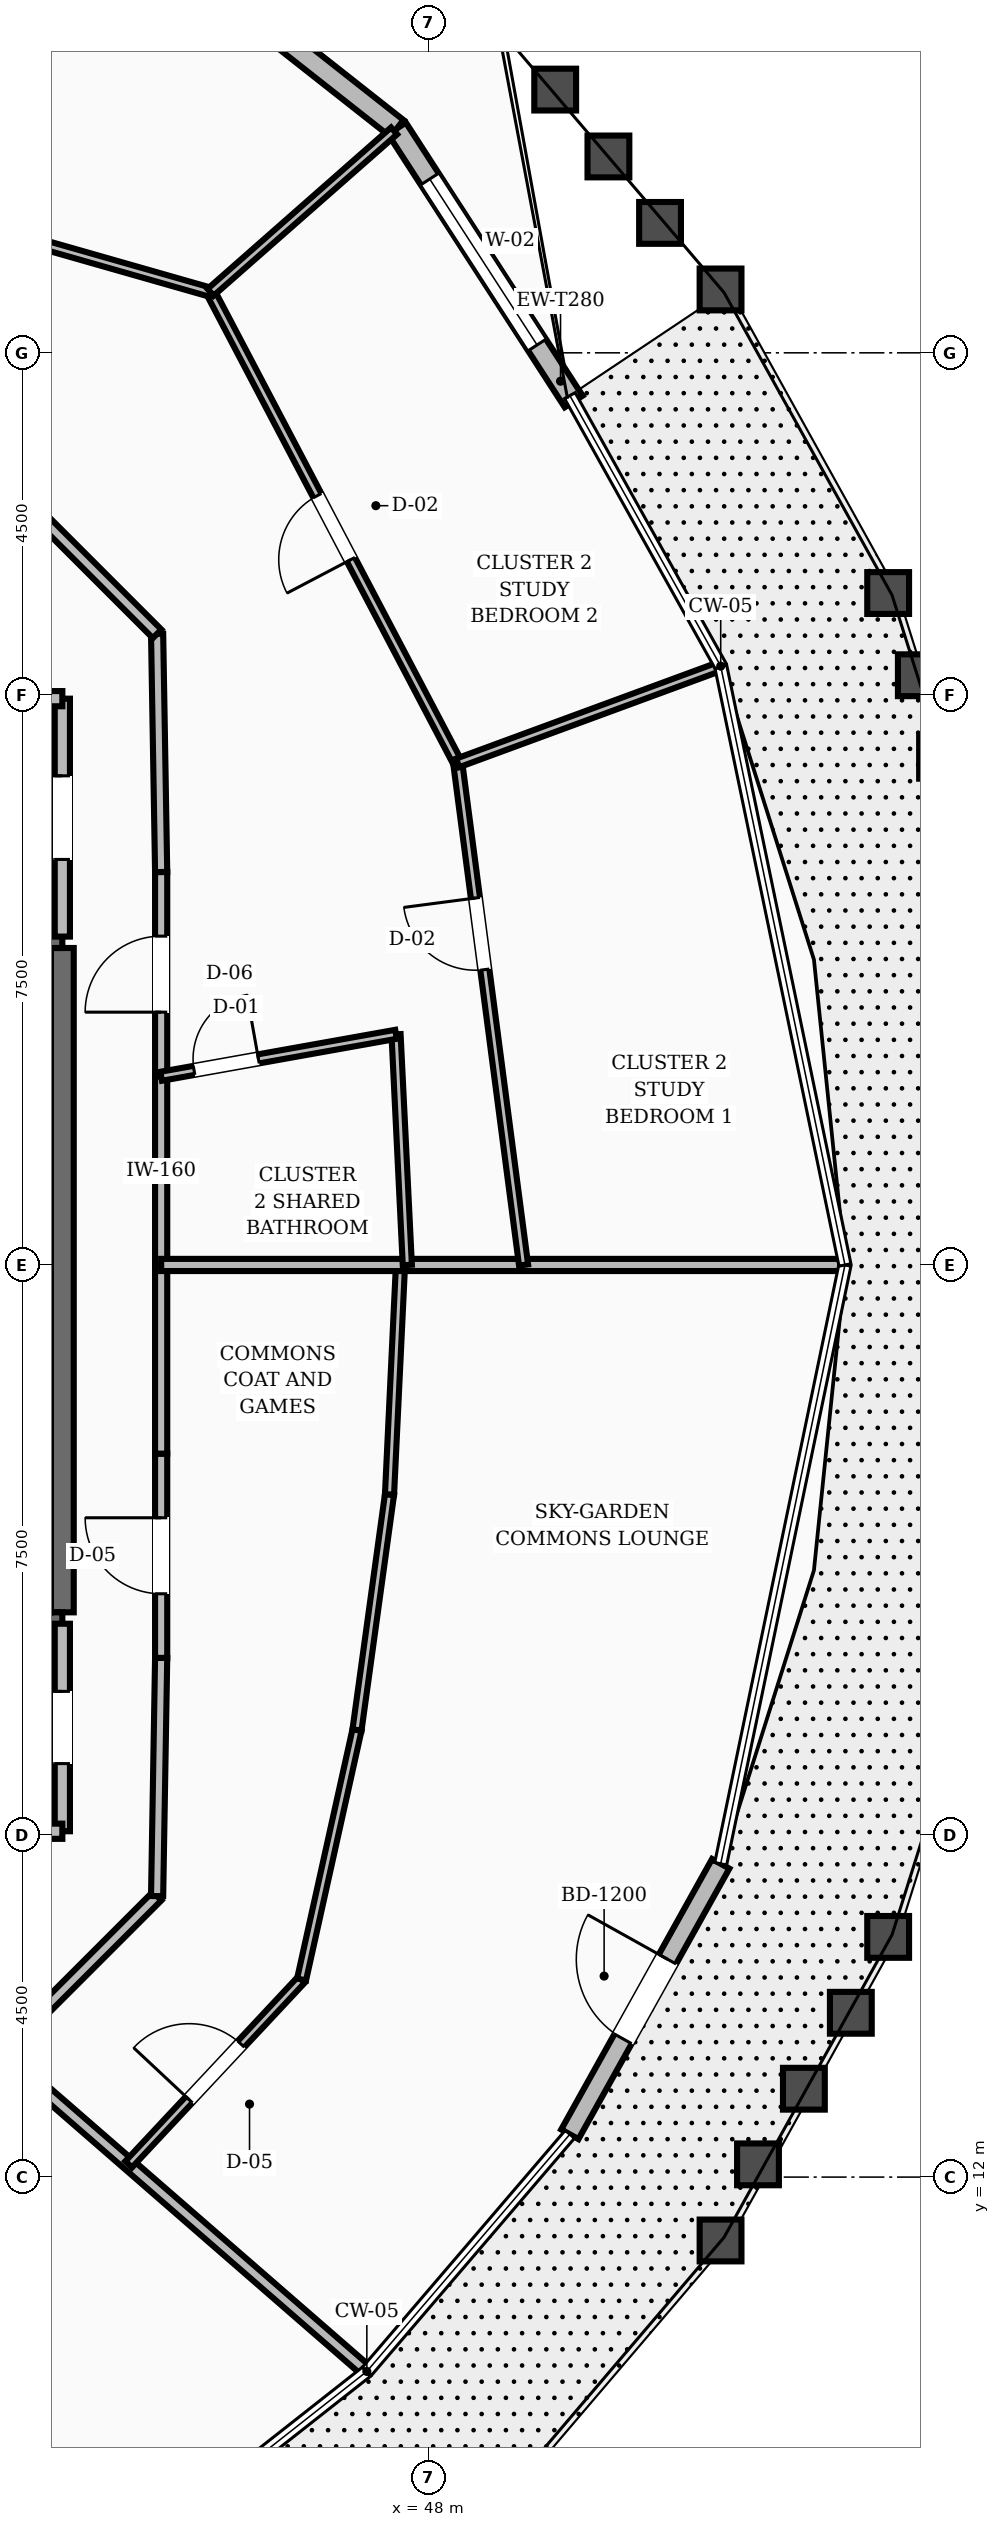
"""IFC4 building model, lengths in metres.
Left out: names, types, materials, properties, quantities, classifications, styles, units other than length and angle.
Written with IfcOpenShell. Run it as: python <this file> out.ifc"""

import sys

from ifc_helpers import new_model, si_unit, direction, frame, frame_2d, origin, place, context, subcontext, project, spatial, rectangle, extrude, element, fill, save


model = new_model("IFC4")
c1 = context("Model", 3, precision=1e-05, world=origin(), true_north=direction((0.0, 1.0)))
c2 = subcontext(c1, "Body", "Model", "MODEL_VIEW")
j1 = project(units=[si_unit("LENGTHUNIT", "METRE"), si_unit("PLANEANGLEUNIT", "RADIAN")], contexts=[c1])
p1 = place(None, origin())
s1 = spatial("IfcSite", under=j1, at=p1, CompositionType="ELEMENT")
p2 = place(p1, origin())
s2 = spatial("IfcBuilding", under=s1, at=p2, CompositionType="ELEMENT")
p3 = place(p2, frame((0.0, 0.0, 236.4)))
s3 = spatial("IfcBuildingStorey", under=s2, at=p3, CompositionType="ELEMENT", Elevation=236.4)
p4 = place(p3, frame((43.18, 19.43, 0.0), z_axis=(0.0, 0.0, 1.0), x_axis=(0.0, 1.0, 0.0)))
e1 = element("IfcWall", 1, at=p4, inside=s3, PredefinedType="SHEAR", context=c2, shape_type="SweptSolid", body=[
    extrude(rectangle(XDim=8.74, YDim=0.3, at=frame_2d((4.37, 0.0))), origin(), (0.0, 0.0, 1.0), 3.6),
])
p5 = place(p3, frame((39.58, 19.28, 0.0), z_axis=(0.0, 0.0, 1.0), x_axis=(1.0, 0.0, 0.0)))
e2 = element("IfcWall", 2, at=p5, inside=s3, PredefinedType="SHEAR", context=c2, shape_type="SweptSolid", body=[
    extrude(rectangle(XDim=3.6, YDim=0.3, at=frame_2d((1.8, 0.0))), origin(), (0.0, 0.0, 1.0), 3.6),
])
p6 = place(p3, frame((39.58, 28.32, 0.0), z_axis=(0.0, 0.0, 1.0), x_axis=(1.0, 0.0, 0.0)))
e3 = element("IfcWall", 3, at=p6, inside=s3, PredefinedType="SHEAR", context=c2, shape_type="SweptSolid", body=[
    extrude(rectangle(XDim=3.6, YDim=0.3, at=frame_2d((1.8, 0.0))), origin(), (0.0, 0.0, 1.0), 3.6),
])
p7 = place(p6, frame((1.3, 0.0, 0.0)))
e4 = element("IfcOpeningElement", 4, at=p7, cuts=e3, PredefinedType="OPENING", context=c2, shape_type="SweptSolid", body=[
    extrude(rectangle(XDim=1.1, YDim=2.1, at=frame_2d((0.55, 1.05))), frame((0.0, 0.16, 0.0), z_axis=(0.0, -1.0, 0.0), x_axis=(1.0, 0.0, 0.0)), (0.0, 0.0, 1.0), 0.32),
])
p8 = place(p3, frame((49.907, 35.36, 0.0), z_axis=(0.0, 0.0, 1.0), x_axis=(-0.543286759964, 0.839547197273, 0.0)))
e5 = element("IfcWall", 5, at=p8, inside=s3, PredefinedType="STANDARD", context=c2, shape_type="SweptSolid", body=[
    extrude(rectangle(XDim=4.279, YDim=0.28, at=frame_2d((2.14, 0.0))), origin(), (0.0, 0.0, 1.0), 2.88),
])
p9 = place(p8, frame((0.886, 0.0, 0.8)))
e6 = element("IfcOpeningElement", 6, at=p9, cuts=e5, PredefinedType="OPENING", context=c2, shape_type="SweptSolid", body=[
    extrude(rectangle(XDim=2.6, YDim=1.65, at=frame_2d((1.3, 0.825))), frame((0.0, 0.15, 0.0), z_axis=(0.0, -1.0, 0.0), x_axis=(1.0, 0.0, 0.0)), (0.0, 0.0, 1.0), 0.3),
])
p10 = place(p3, frame((47.582, 38.953, 0.0), z_axis=(0.0, 0.0, 1.0), x_axis=(-0.78564818009, 0.618673530322, 0.0)))
e7 = element("IfcWall", 7, at=p10, inside=s3, PredefinedType="STANDARD", context=c2, shape_type="SweptSolid", body=[
    extrude(rectangle(XDim=4.25, YDim=0.28, at=frame_2d((2.125, 0.0))), origin(), (0.0, 0.0, 1.0), 2.88),
])
p11 = place(p3, frame((49.857, 12.563, 0.0), z_axis=(0.0, 0.0, 1.0), x_axis=(0.487020857791, 0.873390338896, 0.0)))
e8 = element("IfcWall", 8, at=p11, inside=s3, PredefinedType="STANDARD", context=c2, shape_type="SweptSolid", body=[
    extrude(rectangle(XDim=4.075, YDim=0.26, at=frame_2d((2.038, 0.0))), origin(), (0.0, 0.0, 1.0), 2.88),
])
p12 = place(p11, frame((1.438, 0.0, 0.0)))
e9 = element("IfcOpeningElement", 9, at=p12, cuts=e8, PredefinedType="OPENING", context=c2, shape_type="SweptSolid", body=[
    extrude(rectangle(XDim=1.2, YDim=2.15, at=frame_2d((0.6, 1.075))), frame((0.0, 0.14, 0.0), z_axis=(0.0, -1.0, 0.0), x_axis=(1.0, 0.0, 0.0)), (0.0, 0.0, 1.0), 0.28),
])
p13 = place(p3, frame((43.18, 28.32, 0.0), z_axis=(0.0, 0.0, 1.0), x_axis=(0.0, 1.0, 0.0)))
e10 = element("IfcWall", 10, at=p13, inside=s3, PredefinedType="SOLIDWALL", context=c2, shape_type="SweptSolid", body=[
    extrude(rectangle(XDim=3.13, YDim=0.2, at=frame_2d((1.565, 0.0))), origin(), (0.0, 0.0, 1.0), 2.87),
])
p14 = place(p13, frame((1.015, 0.0, 0.0)))
e11 = element("IfcOpeningElement", 11, at=p14, cuts=e10, PredefinedType="OPENING", context=c2, shape_type="SweptSolid", body=[
    extrude(rectangle(XDim=1.1, YDim=2.1, at=frame_2d((0.55, 1.05))), frame((0.0, 0.11, 0.0), z_axis=(0.0, -1.0, 0.0), x_axis=(1.0, 0.0, 0.0)), (0.0, 0.0, 1.0), 0.22),
])
p15 = place(p3, frame((39.2, 31.45, 0.0), z_axis=(0.0, 0.0, 1.0), x_axis=(1.0, 0.0, 0.0)))
e12 = element("IfcWall", 12, at=p15, inside=s3, PredefinedType="SOLIDWALL", context=c2, shape_type="SweptSolid", body=[
    extrude(rectangle(XDim=3.98, YDim=0.2, at=frame_2d((1.99, 0.0))), origin(), (0.0, 0.0, 1.0), 2.87),
])
p16 = place(p3, frame((43.18, 16.55, 0.0), z_axis=(0.0, 0.0, 1.0), x_axis=(0.0, 1.0, 0.0)))
e13 = element("IfcWall", 13, at=p16, inside=s3, PredefinedType="SOLIDWALL", context=c2, shape_type="SweptSolid", body=[
    extrude(rectangle(XDim=2.73, YDim=0.2, at=frame_2d((1.365, 0.0))), origin(), (0.0, 0.0, 1.0), 2.87),
])
p17 = place(p16, frame((0.89, 0.0, 0.0)))
e14 = element("IfcOpeningElement", 14, at=p17, cuts=e13, PredefinedType="OPENING", context=c2, shape_type="SweptSolid", body=[
    extrude(rectangle(XDim=0.95, YDim=2.1, at=frame_2d((0.475, 1.05))), frame((0.0, 0.11, 0.0), z_axis=(0.0, -1.0, 0.0), x_axis=(1.0, 0.0, 0.0)), (0.0, 0.0, 1.0), 0.22),
])
p18 = place(p3, frame((39.2, 16.55, 0.0), z_axis=(0.0, 0.0, 1.0), x_axis=(1.0, 0.0, 0.0)))
e15 = element("IfcWall", 15, at=p18, inside=s3, PredefinedType="SOLIDWALL", context=c2, shape_type="SweptSolid", body=[
    extrude(rectangle(XDim=3.98, YDim=0.2, at=frame_2d((1.99, 0.0))), origin(), (0.0, 0.0, 1.0), 2.87),
])
p19 = place(p3, frame((44.48, 24.0, 0.0), z_axis=(0.0, 0.0, 1.0), x_axis=(0.0, 1.0, 0.0)))
e16 = element("IfcWall", 16, at=p19, inside=s3, PredefinedType="SOLIDWALL", context=c2, shape_type="SweptSolid", body=[
    extrude(rectangle(XDim=2.482, YDim=0.16, at=frame_2d((1.241, 0.0))), origin(), (0.0, 0.0, 1.0), 2.87),
])
p20 = place(p3, frame((44.48, 26.482, 0.0), z_axis=(0.0, 0.0, 1.0), x_axis=(0.0, 1.0, 0.0)))
e17 = element("IfcWall", 17, at=p20, inside=s3, PredefinedType="SOLIDWALL", context=c2, shape_type="SweptSolid", body=[
    extrude(rectangle(XDim=2.687, YDim=0.16, at=frame_2d((1.344, 0.0))), origin(), (0.0, 0.0, 1.0), 2.87),
])
p21 = place(p20, frame((0.844, 0.0, 0.0)))
e18 = element("IfcOpeningElement", 18, at=p21, cuts=e17, PredefinedType="OPENING", context=c2, shape_type="SweptSolid", body=[
    extrude(rectangle(XDim=1.0, YDim=2.1, at=frame_2d((0.5, 1.05))), frame((0.0, 0.09, 0.0), z_axis=(0.0, -1.0, 0.0), x_axis=(1.0, 0.0, 0.0)), (0.0, 0.0, 1.0), 0.18),
])
p22 = place(p3, frame((44.48, 29.169, 0.0), z_axis=(0.0, 0.0, 1.0), x_axis=(-0.016981035134, 0.999855811828, 0.0)))
e19 = element("IfcWall", 19, at=p22, inside=s3, PredefinedType="SOLIDWALL", context=c2, shape_type="SweptSolid", body=[
    extrude(rectangle(XDim=3.134, YDim=0.16, at=frame_2d((1.567, 0.0))), origin(), (0.0, 0.0, 1.0), 2.87),
])
for number, where, z_axis, x_axis in (
    (20, (44.427, 32.303, 0.0), (0.0, 0.0, 1.0), (-0.707, 0.707, 0.0)),
    (21, (42.365, 13.635, 0.0), (0.0, 0.0, 1.0), (0.707, 0.707, 0.0)),
):
    element("IfcWall", number, at=place(p3, frame(where, z_axis=z_axis, x_axis=x_axis)), inside=s3, PredefinedType="SOLIDWALL", context=c2, shape_type="SweptSolid", body=[
        extrude(rectangle(XDim=2.916, YDim=0.16, at=frame_2d((1.458, 0.0))), origin(), (0.0, 0.0, 1.0), 2.87),
    ])
p23 = place(p3, frame((44.427, 15.697, 0.0), z_axis=(0.0, 0.0, 1.0), x_axis=(0.016981035134, 0.999855811828, 0.0)))
e22 = element("IfcWall", 22, at=p23, inside=s3, PredefinedType="SOLIDWALL", context=c2, shape_type="SweptSolid", body=[
    extrude(rectangle(XDim=3.134, YDim=0.16, at=frame_2d((1.567, 0.0))), origin(), (0.0, 0.0, 1.0), 2.87),
])
p24 = place(p3, frame((44.48, 18.831, 0.0), z_axis=(0.0, 0.0, 1.0), x_axis=(0.0, 1.0, 0.0)))
e23 = element("IfcWall", 23, at=p24, inside=s3, PredefinedType="SOLIDWALL", context=c2, shape_type="SweptSolid", body=[
    extrude(rectangle(XDim=2.687, YDim=0.16, at=frame_2d((1.344, 0.0))), origin(), (0.0, 0.0, 1.0), 2.87),
])
p25 = place(p24, frame((0.844, 0.0, 0.0)))
e24 = element("IfcOpeningElement", 24, at=p25, cuts=e23, PredefinedType="OPENING", context=c2, shape_type="SweptSolid", body=[
    extrude(rectangle(XDim=1.0, YDim=2.1, at=frame_2d((0.5, 1.05))), frame((0.0, 0.09, 0.0), z_axis=(0.0, -1.0, 0.0), x_axis=(1.0, 0.0, 0.0)), (0.0, 0.0, 1.0), 0.18),
])
p26 = place(p3, frame((44.48, 21.518, 0.0), z_axis=(0.0, 0.0, 1.0), x_axis=(0.0, 1.0, 0.0)))
e25 = element("IfcWall", 25, at=p26, inside=s3, PredefinedType="SOLIDWALL", context=c2, shape_type="SweptSolid", body=[
    extrude(rectangle(XDim=2.482, YDim=0.16, at=frame_2d((1.241, 0.0))), origin(), (0.0, 0.0, 1.0), 2.87),
])
p27 = place(p3, frame((42.365, 13.635, 0.0), z_axis=(0.0, 0.0, 1.0), x_axis=(0.75465361638, -0.656123402482, 0.0)))
e26 = element("IfcWall", 26, at=p27, inside=s3, PredefinedType="SOLIDWALL", context=c2, shape_type="SweptSolid", body=[
    extrude(rectangle(XDim=6.338, YDim=0.16, at=frame_2d((3.169, 0.0))), origin(), (0.0, 0.0, 1.0), 2.87),
])
p28 = place(p3, frame((44.052, 12.168, 0.0), z_axis=(0.0, 0.0, 1.0), x_axis=(0.683143255068, 0.730284391901, 0.0)))
e27 = element("IfcWall", 27, at=p28, inside=s3, PredefinedType="PARTITIONING", context=c2, shape_type="SweptSolid", body=[
    extrude(rectangle(XDim=3.33, YDim=0.12, at=frame_2d((1.665, 0.0))), origin(), (0.0, 0.0, 1.0), 2.87),
])
p29 = place(p28, frame((1.165, 0.0, 0.0)))
e28 = element("IfcOpeningElement", 28, at=p29, cuts=e27, PredefinedType="OPENING", context=c2, shape_type="SweptSolid", body=[
    extrude(rectangle(XDim=1.0, YDim=2.1, at=frame_2d((0.5, 1.05))), frame((0.0, 0.07, 0.0), z_axis=(0.0, -1.0, 0.0), x_axis=(1.0, 0.0, 0.0)), (0.0, 0.0, 1.0), 0.14),
])
p30 = place(p3, frame((46.327, 14.6, 0.0), z_axis=(0.0, 0.0, 1.0), x_axis=(0.216792083166, 0.976217799815, 0.0)))
e29 = element("IfcWall", 29, at=p30, inside=s3, PredefinedType="PARTITIONING", context=c2, shape_type="SweptSolid", body=[
    extrude(rectangle(XDim=3.363, YDim=0.12, at=frame_2d((1.681, 0.0))), origin(), (0.0, 0.0, 1.0), 2.87),
])
p31 = place(p3, frame((47.056, 17.883, 0.0), z_axis=(0.0, 0.0, 1.0), x_axis=(0.136840789859, 0.990593053797, 0.0)))
e30 = element("IfcWall", 30, at=p31, inside=s3, PredefinedType="PARTITIONING", context=c2, shape_type="SweptSolid", body=[
    extrude(rectangle(XDim=3.128, YDim=0.12, at=frame_2d((1.564, 0.0))), origin(), (0.0, 0.0, 1.0), 2.87),
])
p32 = place(p3, frame((47.484, 20.981, 0.0), z_axis=(0.0, 0.0, 1.0), x_axis=(0.047733994434, 0.998860083183, 0.0)))
e31 = element("IfcWall", 31, at=p32, inside=s3, PredefinedType="PARTITIONING", context=c2, shape_type="SweptSolid", body=[
    extrude(rectangle(XDim=3.023, YDim=0.12, at=frame_2d((1.511, 0.0))), origin(), (0.0, 0.0, 1.0), 2.87),
])
p33 = place(p3, frame((44.48, 24.0, 0.0), z_axis=(0.0, 0.0, 1.0), x_axis=(1.0, 0.0, 0.0)))
e32 = element("IfcWall", 32, at=p33, inside=s3, PredefinedType="SOLIDWALL", context=c2, shape_type="SweptSolid", body=[
    extrude(rectangle(XDim=8.946, YDim=0.16, at=frame_2d((4.473, 0.0))), origin(), (0.0, 0.0, 1.0), 2.87),
])
p34 = place(p3, frame((47.719, 24.0, 0.0), z_axis=(0.0, 0.0, 1.0), x_axis=(-0.048939597686, 0.998801739976, 0.0)))
e33 = element("IfcWall", 33, at=p34, inside=s3, PredefinedType="PARTITIONING", context=c2, shape_type="SweptSolid", body=[
    extrude(rectangle(XDim=3.038, YDim=0.12, at=frame_2d((1.519, 0.0))), origin(), (0.0, 0.0, 1.0), 2.87),
])
p35 = place(p3, frame((44.48, 26.482, 0.0), z_axis=(0.0, 0.0, 1.0), x_axis=(0.984416517577, 0.175852551651, 0.0)))
e34 = element("IfcWall", 34, at=p35, inside=s3, PredefinedType="PARTITIONING", context=c2, shape_type="SweptSolid", body=[
    extrude(rectangle(XDim=3.139, YDim=0.12, at=frame_2d((1.569, 0.0))), origin(), (0.0, 0.0, 1.0), 2.87),
])
p36 = place(p35, frame((0.44, 0.0, 0.0)))
e35 = element("IfcOpeningElement", 35, at=p36, cuts=e34, PredefinedType="OPENING", context=c2, shape_type="SweptSolid", body=[
    extrude(rectangle(XDim=0.86, YDim=2.1, at=frame_2d((0.43, 1.05))), frame((0.0, 0.07, 0.0), z_axis=(0.0, -1.0, 0.0), x_axis=(1.0, 0.0, 0.0)), (0.0, 0.0, 1.0), 0.14),
])
p37 = place(p3, frame((49.248, 24.0, 0.0), z_axis=(0.0, 0.0, 1.0), x_axis=(-0.130067703559, 0.991505114707, 0.0)))
e36 = element("IfcWall", 36, at=p37, inside=s3, PredefinedType="PARTITIONING", context=c2, shape_type="SweptSolid", body=[
    extrude(rectangle(XDim=6.662, YDim=0.12, at=frame_2d((3.331, 0.0))), origin(), (0.0, 0.0, 1.0), 2.87),
])
p38 = place(p37, frame((3.919, 0.0, 0.0)))
e37 = element("IfcOpeningElement", 37, at=p38, cuts=e36, PredefinedType="OPENING", context=c2, shape_type="SweptSolid", body=[
    extrude(rectangle(XDim=0.95, YDim=2.1, at=frame_2d((0.475, 1.05))), frame((0.0, 0.07, 0.0), z_axis=(0.0, -1.0, 0.0), x_axis=(1.0, 0.0, 0.0)), (0.0, 0.0, 1.0), 0.14),
])
p39 = place(p3, frame((48.382, 30.605, 0.0), z_axis=(0.0, 0.0, 1.0), x_axis=(-0.46497072963, 0.885326053264, 0.0)))
e38 = element("IfcWall", 38, at=p39, inside=s3, PredefinedType="PARTITIONING", context=c2, shape_type="SweptSolid", body=[
    extrude(rectangle(XDim=6.993, YDim=0.12, at=frame_2d((3.497, 0.0))), origin(), (0.0, 0.0, 1.0), 2.87),
])
p40 = place(p39, frame((3.021, 0.0, 0.0)))
e39 = element("IfcOpeningElement", 39, at=p40, cuts=e38, PredefinedType="OPENING", context=c2, shape_type="SweptSolid", body=[
    extrude(rectangle(XDim=0.95, YDim=2.1, at=frame_2d((0.475, 1.05))), frame((0.0, 0.07, 0.0), z_axis=(0.0, -1.0, 0.0), x_axis=(1.0, 0.0, 0.0)), (0.0, 0.0, 1.0), 0.14),
])
p41 = place(p3, frame((48.382, 30.605, 0.0), z_axis=(0.0, 0.0, 1.0), x_axis=(0.938506911952, 0.345260446936, 0.0)))
e40 = element("IfcWall", 40, at=p41, inside=s3, PredefinedType="PARTITIONING", context=c2, shape_type="SweptSolid", body=[
    extrude(rectangle(XDim=3.637, YDim=0.12, at=frame_2d((1.818, 0.0))), origin(), (0.0, 0.0, 1.0), 2.87),
])
p42 = place(p3, frame((45.13, 36.796, 0.0), z_axis=(0.0, 0.0, 1.0), x_axis=(-0.961595149336, 0.274471799595, 0.0)))
e41 = element("IfcWall", 41, at=p42, inside=s3, PredefinedType="PARTITIONING", context=c2, shape_type="SweptSolid", body=[
    extrude(rectangle(XDim=7.113, YDim=0.12, at=frame_2d((3.557, 0.0))), origin(), (0.0, 0.0, 1.0), 2.87),
])
p43 = place(p42, frame((3.082, 0.0, 0.0)))
e42 = element("IfcOpeningElement", 42, at=p43, cuts=e41, PredefinedType="OPENING", context=c2, shape_type="SweptSolid", body=[
    extrude(rectangle(XDim=0.95, YDim=2.1, at=frame_2d((0.475, 1.05))), frame((0.0, 0.07, 0.0), z_axis=(0.0, -1.0, 0.0), x_axis=(1.0, 0.0, 0.0)), (0.0, 0.0, 1.0), 0.14),
])
p44 = place(p3, frame((45.13, 36.796, 0.0), z_axis=(0.0, 0.0, 1.0), x_axis=(0.750946942574, 0.66036254394, 0.0)))
e43 = element("IfcWall", 43, at=p44, inside=s3, PredefinedType="PARTITIONING", context=c2, shape_type="SweptSolid", body=[
    extrude(rectangle(XDim=3.215, YDim=0.12, at=frame_2d((1.608, 0.0))), origin(), (0.0, 0.0, 1.0), 2.87),
])
p45 = place(p9, origin())
e44 = element("IfcWindow", 44, at=p45, inside=s3, PartitioningType="SINGLE_PANEL", PredefinedType="WINDOW", context=c2, shape_type="SweptSolid", body=[
    extrude(rectangle(XDim=2.6, YDim=1.65, at=frame_2d((1.3, 0.825))), frame((0.0, 0.03, 0.0), z_axis=(0.0, -1.0, 0.0), x_axis=(1.0, 0.0, 0.0)), (0.0, 0.0, 1.0), 0.06),
])
fill(e6, e44)
p46 = place(p12, origin())
e45 = element("IfcDoor", 45, at=p46, inside=s3, OperationType="SINGLE_SWING_RIGHT", PredefinedType="DOOR", context=c2, shape_type="SweptSolid", body=[
    extrude(rectangle(XDim=1.2, YDim=2.15, at=frame_2d((0.6, 1.075))), frame((0.0, 0.025, 0.0), z_axis=(0.0, -1.0, 0.0), x_axis=(1.0, 0.0, 0.0)), (0.0, 0.0, 1.0), 0.05),
])
fill(e9, e45)
p47 = place(p14, origin())
e46 = element("IfcDoor", 46, at=p47, inside=s3, OperationType="SINGLE_SWING_RIGHT", PredefinedType="DOOR", context=c2, shape_type="SweptSolid", body=[
    extrude(rectangle(XDim=1.1, YDim=2.1, at=frame_2d((0.55, 1.05))), frame((0.0, 0.025, 0.0), z_axis=(0.0, -1.0, 0.0), x_axis=(1.0, 0.0, 0.0)), (0.0, 0.0, 1.0), 0.05),
])
fill(e11, e46)
p48 = place(p17, origin())
e47 = element("IfcDoor", 47, at=p48, inside=s3, OperationType="SINGLE_SWING_RIGHT", PredefinedType="DOOR", context=c2, shape_type="SweptSolid", body=[
    extrude(rectangle(XDim=0.95, YDim=2.1, at=frame_2d((0.475, 1.05))), frame((0.0, 0.025, 0.0), z_axis=(0.0, -1.0, 0.0), x_axis=(1.0, 0.0, 0.0)), (0.0, 0.0, 1.0), 0.05),
])
fill(e14, e47)
p49 = place(p25, origin())
e48 = element("IfcDoor", 48, at=p49, inside=s3, OperationType="SINGLE_SWING_RIGHT", PredefinedType="DOOR", context=c2, shape_type="SweptSolid", body=[
    extrude(rectangle(XDim=1.0, YDim=2.1, at=frame_2d((0.5, 1.05))), frame((0.0, 0.025, 0.0), z_axis=(0.0, -1.0, 0.0), x_axis=(1.0, 0.0, 0.0)), (0.0, 0.0, 1.0), 0.05),
])
fill(e24, e48)
p50 = place(p29, origin())
e49 = element("IfcDoor", 49, at=p50, inside=s3, OperationType="SINGLE_SWING_LEFT", PredefinedType="DOOR", context=c2, shape_type="SweptSolid", body=[
    extrude(rectangle(XDim=1.0, YDim=2.1, at=frame_2d((0.5, 1.05))), frame((0.0, 0.025, 0.0), z_axis=(0.0, -1.0, 0.0), x_axis=(1.0, 0.0, 0.0)), (0.0, 0.0, 1.0), 0.05),
])
fill(e28, e49)
p51 = place(p36, origin())
e50 = element("IfcDoor", 50, at=p51, inside=s3, OperationType="SINGLE_SWING_RIGHT", PredefinedType="DOOR", context=c2, shape_type="SweptSolid", body=[
    extrude(rectangle(XDim=0.86, YDim=2.1, at=frame_2d((0.43, 1.05))), frame((0.0, 0.025, 0.0), z_axis=(0.0, -1.0, 0.0), x_axis=(1.0, 0.0, 0.0)), (0.0, 0.0, 1.0), 0.05),
])
fill(e35, e50)
p52 = place(p21, origin())
e51 = element("IfcDoor", 51, at=p52, inside=s3, OperationType="SINGLE_SWING_LEFT", PredefinedType="DOOR", context=c2, shape_type="SweptSolid", body=[
    extrude(rectangle(XDim=1.0, YDim=2.1, at=frame_2d((0.5, 1.05))), frame((0.0, 0.025, 0.0), z_axis=(0.0, -1.0, 0.0), x_axis=(1.0, 0.0, 0.0)), (0.0, 0.0, 1.0), 0.05),
])
fill(e18, e51)
p53 = place(p38, origin())
e52 = element("IfcDoor", 52, at=p53, inside=s3, OperationType="SINGLE_SWING_RIGHT", PredefinedType="DOOR", context=c2, shape_type="SweptSolid", body=[
    extrude(rectangle(XDim=0.95, YDim=2.1, at=frame_2d((0.475, 1.05))), frame((0.0, 0.025, 0.0), z_axis=(0.0, -1.0, 0.0), x_axis=(1.0, 0.0, 0.0)), (0.0, 0.0, 1.0), 0.05),
])
fill(e37, e52)
p54 = place(p40, origin())
e53 = element("IfcDoor", 53, at=p54, inside=s3, OperationType="SINGLE_SWING_LEFT", PredefinedType="DOOR", context=c2, shape_type="SweptSolid", body=[
    extrude(rectangle(XDim=0.95, YDim=2.1, at=frame_2d((0.475, 1.05))), frame((0.0, 0.025, 0.0), z_axis=(0.0, -1.0, 0.0), x_axis=(1.0, 0.0, 0.0)), (0.0, 0.0, 1.0), 0.05),
])
fill(e39, e53)
save(model, sys.argv[1])
